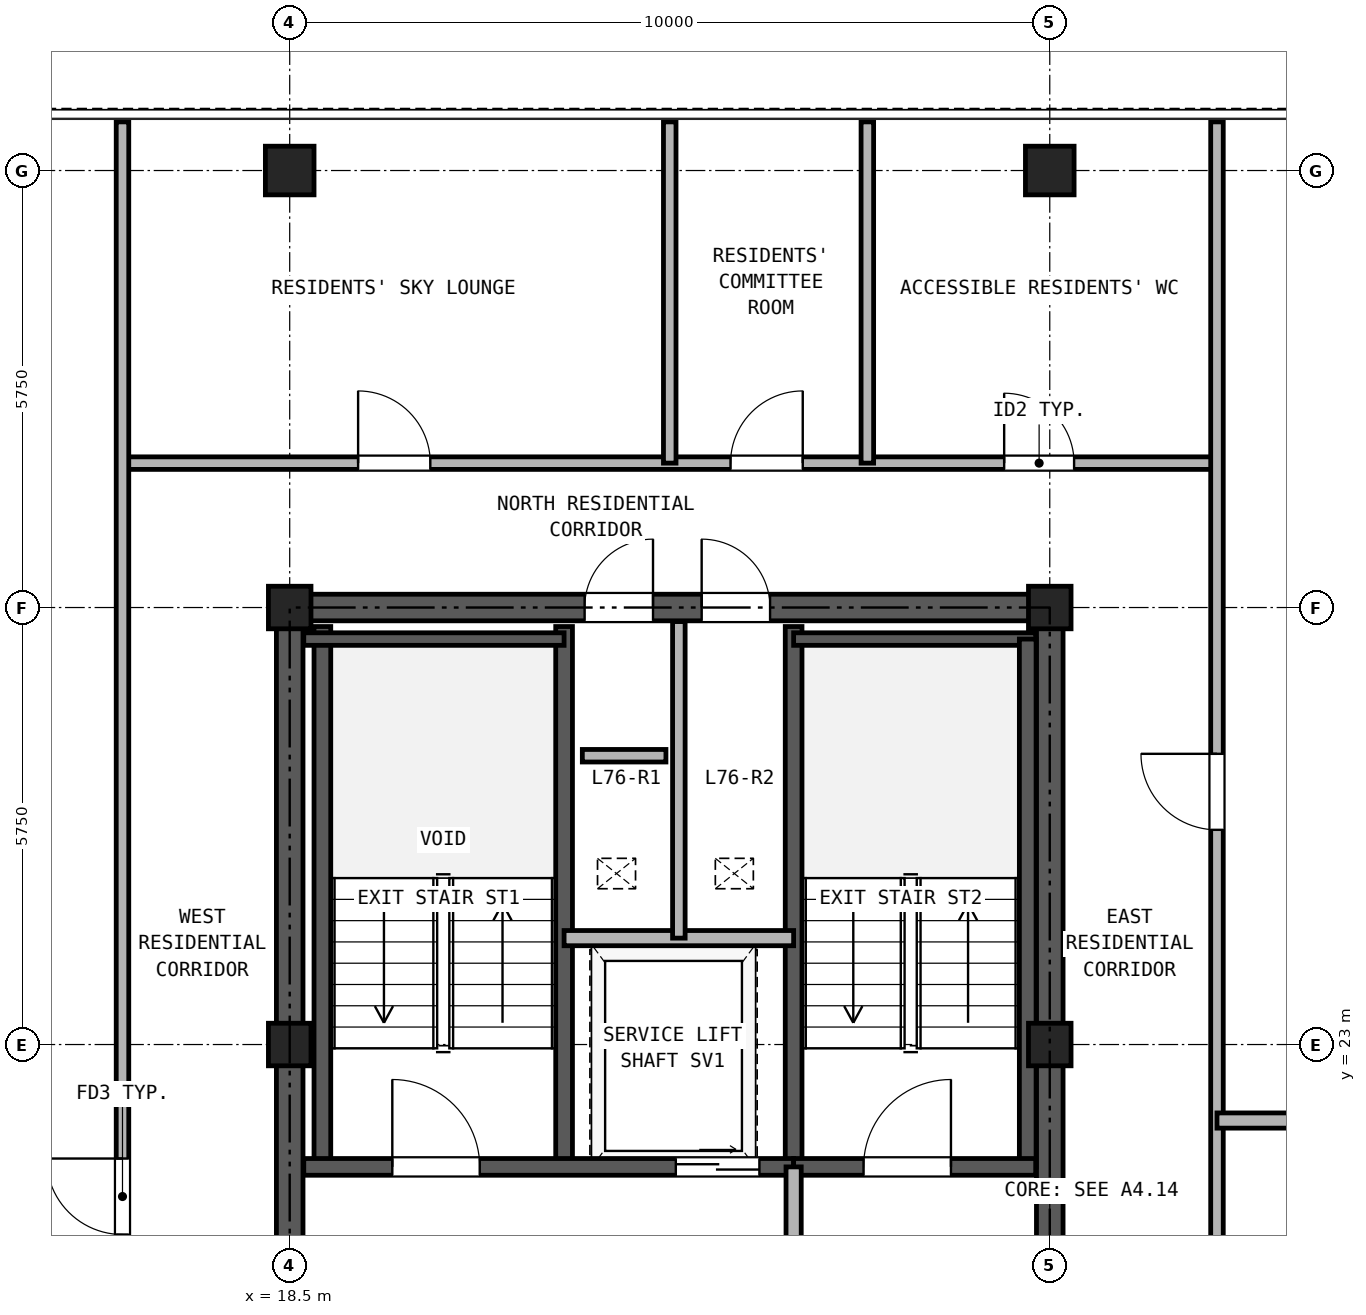
"""IFC4 building model, lengths in metres.
Left out: names, types, materials, properties, quantities, classifications, styles, units other than length and angle.
Written with IfcOpenShell. Run it as: python <this file> out.ifc"""

import sys

from ifc_helpers import new_model, si_unit, direction, frame, frame_2d, origin, origin_2d, place, context, subcontext, project, spatial, rectangle, hollow_rectangle, extrude, source, transform, mapped, element, fill, save


model = new_model("IFC4")
c1 = context("Model", 3, precision=1e-05, world=origin(), true_north=direction((0.0, 1.0)))
c2 = subcontext(c1, "Body", "Model", "MODEL_VIEW")
j1 = project(units=[si_unit("LENGTHUNIT", "METRE"), si_unit("PLANEANGLEUNIT", "RADIAN")], contexts=[c1])
p1 = place(None, origin())
s1 = spatial("IfcSite", under=j1, at=p1, CompositionType="ELEMENT")
p2 = place(p1, origin())
s2 = spatial("IfcBuilding", under=s1, at=p2, CompositionType="ELEMENT")
p3 = place(p2, frame((0.0, 0.0, 264.9)))
s3 = spatial("IfcBuildingStorey", under=s2, at=p3, CompositionType="ELEMENT", Elevation=264.9)
m1 = source(origin(), c2, "Body", "SweptSolid", [
    extrude(hollow_rectangle(XDim=0.64, YDim=0.64, WallThickness=0.035, at=origin_2d()), origin(), (0.0, 0.0, 1.0), 2.98),
])
for number, where, z_axis, x_axis in (
    (1, (18.5, 34.5, 0.0), (0.0, 0.0, 1.0), (1.0, 0.0, 0.0)),
    (2, (28.5, 34.5, 0.0), (0.0, 0.0, 1.0), (1.0, 0.0, 0.0)),
):
    element("IfcColumn", number, at=place(p3, frame(where, z_axis=z_axis, x_axis=x_axis)), inside=s3, PredefinedType="COLUMN", context=c2, shape_type="MappedRepresentation", body=[
        mapped(m1, transform((0.0, 0.0, 0.0), x_axis=(1.0, 0.0, 0.0), y_axis=(0.0, 1.0, 0.0), z_axis=(0.0, 0.0, 1.0), scale=1.0)),
    ])
m2 = source(origin(), c2, "Body", "SweptSolid", [
    extrude(hollow_rectangle(XDim=0.56, YDim=0.56, WallThickness=0.03, at=origin_2d()), origin(), (0.0, 0.0, 1.0), 2.98),
])
for number, where, z_axis, x_axis in (
    (3, (18.5, 23.0, 0.0), (0.0, 0.0, 1.0), (1.0, 0.0, 0.0)),
    (4, (18.5, 28.75, 0.0), (0.0, 0.0, 1.0), (1.0, 0.0, 0.0)),
    (5, (28.5, 23.0, 0.0), (0.0, 0.0, 1.0), (1.0, 0.0, 0.0)),
    (6, (28.5, 28.75, 0.0), (0.0, 0.0, 1.0), (1.0, 0.0, 0.0)),
):
    element("IfcColumn", number, at=place(p3, frame(where, z_axis=z_axis, x_axis=x_axis)), inside=s3, PredefinedType="COLUMN", context=c2, shape_type="MappedRepresentation", body=[
        mapped(m2, transform((0.0, 0.0, 0.0), x_axis=(1.0, 0.0, 0.0), y_axis=(0.0, 1.0, 0.0), z_axis=(0.0, 0.0, 1.0), scale=1.0)),
    ])
p4 = place(p3, frame((18.325, 28.75, 0.0), z_axis=(0.0, 0.0, 1.0), x_axis=(1.0, 0.0, 0.0)))
e7 = element("IfcWall", 7, at=p4, inside=s3, PredefinedType="SHEAR", context=c2, shape_type="SweptSolid", body=[
    extrude(rectangle(XDim=10.35, YDim=0.35, at=frame_2d((5.175, 0.0))), origin(), (0.0, 0.0, 1.0), 2.98),
])
p5 = place(p4, frame((4.055, 0.0, 0.0)))
e8 = element("IfcOpeningElement", 8, at=p5, cuts=e7, PredefinedType="OPENING", context=c2, shape_type="SweptSolid", body=[
    extrude(rectangle(XDim=0.9, YDim=2.05, at=frame_2d((0.45, 1.025))), frame((0.0, 0.185, 0.0), z_axis=(0.0, -1.0, 0.0), x_axis=(1.0, 0.0, 0.0)), (0.0, 0.0, 1.0), 0.37),
])
p6 = place(p4, frame((5.595, 0.0, 0.0)))
e9 = element("IfcOpeningElement", 9, at=p6, cuts=e7, PredefinedType="OPENING", context=c2, shape_type="SweptSolid", body=[
    extrude(rectangle(XDim=0.9, YDim=2.05, at=frame_2d((0.45, 1.025))), frame((0.0, 0.185, 0.0), z_axis=(0.0, -1.0, 0.0), x_axis=(1.0, 0.0, 0.0)), (0.0, 0.0, 1.0), 0.37),
])
p7 = place(p3, frame((18.5, 11.675, 0.0), z_axis=(0.0, 0.0, 1.0), x_axis=(0.0, 1.0, 0.0)))
e10 = element("IfcWall", 10, at=p7, inside=s3, PredefinedType="SHEAR", context=c2, shape_type="SweptSolid", body=[
    extrude(rectangle(XDim=16.9, YDim=0.35, at=frame_2d((8.45, 0.0))), origin(), (0.0, 0.0, 1.0), 2.98),
])
p8 = place(p7, frame((7.475, 0.0, 0.0)))
e11 = element("IfcOpeningElement", 11, at=p8, cuts=e10, PredefinedType="OPENING", context=c2, shape_type="SweptSolid", body=[
    extrude(rectangle(XDim=1.15, YDim=2.2, at=frame_2d((0.575, 1.1))), frame((0.0, 0.185, 0.0), z_axis=(0.0, -1.0, 0.0), x_axis=(1.0, 0.0, 0.0)), (0.0, 0.0, 1.0), 0.37),
])
p9 = place(p3, frame((28.5, 11.675, 0.0), z_axis=(0.0, 0.0, 1.0), x_axis=(0.0, 1.0, 0.0)))
e12 = element("IfcWall", 12, at=p9, inside=s3, PredefinedType="SHEAR", context=c2, shape_type="SweptSolid", body=[
    extrude(rectangle(XDim=16.9, YDim=0.35, at=frame_2d((8.45, 0.0))), origin(), (0.0, 0.0, 1.0), 2.98),
])
p10 = place(p9, frame((7.475, 0.0, 0.0)))
e13 = element("IfcOpeningElement", 13, at=p10, cuts=e12, PredefinedType="OPENING", context=c2, shape_type="SweptSolid", body=[
    extrude(rectangle(XDim=1.15, YDim=2.2, at=frame_2d((0.575, 1.1))), frame((0.0, 0.185, 0.0), z_axis=(0.0, -1.0, 0.0), x_axis=(1.0, 0.0, 0.0)), (0.0, 0.0, 1.0), 0.37),
])
for number, where, z_axis, x_axis in (
    (14, (18.93, 21.39, 0.0), (0.0, 0.0, 1.0), (0.0, 1.0, 0.0)),
    (15, (22.11, 21.39, 0.0), (0.0, 0.0, 1.0), (0.0, 1.0, 0.0)),
    (16, (25.13, 21.39, 0.0), (0.0, 0.0, 1.0), (0.0, 1.0, 0.0)),
):
    element("IfcWall", number, at=place(p3, frame(where, z_axis=z_axis, x_axis=x_axis)), inside=s3, PredefinedType="SOLIDWALL", context=c2, shape_type="SweptSolid", body=[
        extrude(rectangle(XDim=7.11, YDim=0.22, at=frame_2d((3.555, 0.0))), origin(), (0.0, 0.0, 1.0), 2.98),
    ])
p11 = place(p3, frame((18.685, 28.335, 0.0), z_axis=(0.0, 0.0, 1.0), x_axis=(1.0, 0.0, 0.0)))
e17 = element("IfcWall", 17, at=p11, inside=s3, PredefinedType="PARTITIONING", context=c2, shape_type="SweptSolid", body=[
    extrude(rectangle(XDim=3.425, YDim=0.165, at=frame_2d((1.712, 0.0))), origin(), (0.0, 0.0, 1.0), 2.98),
])
p12 = place(p3, frame((25.13, 28.335, 0.0), z_axis=(0.0, 0.0, 1.0), x_axis=(1.0, 0.0, 0.0)))
e18 = element("IfcWall", 18, at=p12, inside=s3, PredefinedType="PARTITIONING", context=c2, shape_type="SweptSolid", body=[
    extrude(rectangle(XDim=3.185, YDim=0.165, at=frame_2d((1.593, 0.0))), origin(), (0.0, 0.0, 1.0), 2.98),
])
p13 = place(p3, frame((28.21, 21.39, 0.0), z_axis=(0.0, 0.0, 1.0), x_axis=(0.0, 1.0, 0.0)))
e19 = element("IfcWall", 19, at=p13, inside=s3, PredefinedType="SOLIDWALL", context=c2, shape_type="SweptSolid", body=[
    extrude(rectangle(XDim=6.945, YDim=0.22, at=frame_2d((3.473, 0.0))), origin(), (0.0, 0.0, 1.0), 2.98),
])
p14 = place(p3, frame((18.685, 21.39, 0.0), z_axis=(0.0, 0.0, 1.0), x_axis=(1.0, 0.0, 0.0)))
e20 = element("IfcWall", 20, at=p14, inside=s3, PredefinedType="SOLIDWALL", context=c2, shape_type="SweptSolid", body=[
    extrude(rectangle(XDim=6.445, YDim=0.22, at=frame_2d((3.222, 0.0))), origin(), (0.0, 0.0, 1.0), 2.98),
])
p15 = place(p14, frame((1.165, 0.0, 0.0)))
e21 = element("IfcOpeningElement", 21, at=p15, cuts=e20, PredefinedType="OPENING", context=c2, shape_type="SweptSolid", body=[
    extrude(rectangle(XDim=1.15, YDim=2.2, at=frame_2d((0.575, 1.1))), frame((0.0, 0.12, 0.0), z_axis=(0.0, -1.0, 0.0), x_axis=(1.0, 0.0, 0.0)), (0.0, 0.0, 1.0), 0.24),
])
p16 = place(p14, frame((4.895, 0.0, 0.0)))
e22 = element("IfcOpeningElement", 22, at=p16, cuts=e20, PredefinedType="OPENING", context=c2, shape_type="SweptSolid", body=[
    extrude(rectangle(XDim=1.1, YDim=2.25, at=frame_2d((0.55, 1.125))), frame((0.0, 0.12, 0.0), z_axis=(0.0, -1.0, 0.0), x_axis=(1.0, 0.0, 0.0)), (0.0, 0.0, 1.0), 0.24),
])
p17 = place(p3, frame((25.13, 21.39, 0.0), z_axis=(0.0, 0.0, 1.0), x_axis=(1.0, 0.0, 0.0)))
e23 = element("IfcWall", 23, at=p17, inside=s3, PredefinedType="SOLIDWALL", context=c2, shape_type="SweptSolid", body=[
    extrude(rectangle(XDim=3.185, YDim=0.22, at=frame_2d((1.593, 0.0))), origin(), (0.0, 0.0, 1.0), 2.98),
])
p18 = place(p17, frame((0.92, 0.0, 0.0)))
e24 = element("IfcOpeningElement", 24, at=p18, cuts=e23, PredefinedType="OPENING", context=c2, shape_type="SweptSolid", body=[
    extrude(rectangle(XDim=1.15, YDim=2.2, at=frame_2d((0.575, 1.1))), frame((0.0, 0.12, 0.0), z_axis=(0.0, -1.0, 0.0), x_axis=(1.0, 0.0, 0.0)), (0.0, 0.0, 1.0), 0.24),
])
p19 = place(p3, frame((22.11, 24.4, 0.0), z_axis=(0.0, 0.0, 1.0), x_axis=(1.0, 0.0, 0.0)))
e25 = element("IfcWall", 25, at=p19, inside=s3, PredefinedType="PARTITIONING", context=c2, shape_type="SweptSolid", body=[
    extrude(rectangle(XDim=3.02, YDim=0.2, at=frame_2d((1.51, 0.0))), origin(), (0.0, 0.0, 1.0), 2.98),
])
p20 = place(p3, frame((23.62, 24.4, 0.0), z_axis=(0.0, 0.0, 1.0), x_axis=(0.0, 1.0, 0.0)))
e26 = element("IfcWall", 26, at=p20, inside=s3, PredefinedType="PARTITIONING", context=c2, shape_type="SweptSolid", body=[
    extrude(rectangle(XDim=4.165, YDim=0.165, at=frame_2d((2.083, 0.0))), origin(), (0.0, 0.0, 1.0), 2.98),
])
p21 = place(p3, frame((25.13, 18.0, 0.0), z_axis=(0.0, 0.0, 1.0), x_axis=(0.0, 1.0, 0.0)))
e27 = element("IfcWall", 27, at=p21, inside=s3, PredefinedType="PARTITIONING", context=c2, shape_type="SweptSolid", body=[
    extrude(rectangle(XDim=3.39, YDim=0.2, at=frame_2d((1.695, 0.0))), origin(), (0.0, 0.0, 1.0), 2.98),
])
p22 = place(p21, frame((1.1, 0.0, 0.0)))
e28 = element("IfcOpeningElement", 28, at=p22, cuts=e27, PredefinedType="OPENING", context=c2, shape_type="SweptSolid", body=[
    extrude(rectangle(XDim=1.15, YDim=2.2, at=frame_2d((0.575, 1.1))), frame((0.0, 0.11, 0.0), z_axis=(0.0, -1.0, 0.0), x_axis=(1.0, 0.0, 0.0)), (0.0, 0.0, 1.0), 0.22),
])
p23 = place(p3, frame((16.3, 30.65, 0.0), z_axis=(0.0, 0.0, 1.0), x_axis=(1.0, 0.0, 0.0)))
e29 = element("IfcWall", 29, at=p23, inside=s3, PredefinedType="PARTITIONING", context=c2, shape_type="SweptSolid", body=[
    extrude(rectangle(XDim=14.4, YDim=0.165, at=frame_2d((7.2, 0.0))), origin(), (0.0, 0.0, 1.0), 2.98),
])
p24 = place(p23, frame((3.1, 0.0, 0.0)))
e30 = element("IfcOpeningElement", 30, at=p24, cuts=e29, PredefinedType="OPENING", context=c2, shape_type="SweptSolid", body=[
    extrude(rectangle(XDim=0.95, YDim=2.15, at=frame_2d((0.475, 1.075))), frame((0.0, 0.093, 0.0), z_axis=(0.0, -1.0, 0.0), x_axis=(1.0, 0.0, 0.0)), (0.0, 0.0, 1.0), 0.185),
])
p25 = place(p23, frame((8.0, 0.0, 0.0)))
e31 = element("IfcOpeningElement", 31, at=p25, cuts=e29, PredefinedType="OPENING", context=c2, shape_type="SweptSolid", body=[
    extrude(rectangle(XDim=0.95, YDim=2.15, at=frame_2d((0.475, 1.075))), frame((0.0, 0.093, 0.0), z_axis=(0.0, -1.0, 0.0), x_axis=(1.0, 0.0, 0.0)), (0.0, 0.0, 1.0), 0.185),
])
p26 = place(p23, frame((11.6, 0.0, 0.0)))
e32 = element("IfcOpeningElement", 32, at=p26, cuts=e29, PredefinedType="OPENING", context=c2, shape_type="SweptSolid", body=[
    extrude(rectangle(XDim=0.92, YDim=2.1, at=frame_2d((0.46, 1.05))), frame((0.0, 0.093, 0.0), z_axis=(0.0, -1.0, 0.0), x_axis=(1.0, 0.0, 0.0)), (0.0, 0.0, 1.0), 0.185),
])
p27 = place(p3, frame((16.3, 11.35, 0.0), z_axis=(0.0, 0.0, 1.0), x_axis=(0.0, 1.0, 0.0)))
e33 = element("IfcWall", 33, at=p27, inside=s3, PredefinedType="PARTITIONING", context=c2, shape_type="SweptSolid", body=[
    extrude(rectangle(XDim=23.79, YDim=0.165, at=frame_2d((11.895, 0.0))), origin(), (0.0, 0.0, 1.0), 2.98),
])
p28 = place(p27, frame((9.15, 0.0, 0.0)))
e34 = element("IfcOpeningElement", 34, at=p28, cuts=e33, PredefinedType="OPENING", context=c2, shape_type="SweptSolid", body=[
    extrude(rectangle(XDim=1.0, YDim=2.15, at=frame_2d((0.5, 1.075))), frame((0.0, 0.093, 0.0), z_axis=(0.0, -1.0, 0.0), x_axis=(1.0, 0.0, 0.0)), (0.0, 0.0, 1.0), 0.185),
])
p29 = place(p3, frame((30.7, 11.35, 0.0), z_axis=(0.0, 0.0, 1.0), x_axis=(0.0, 1.0, 0.0)))
e35 = element("IfcWall", 35, at=p29, inside=s3, PredefinedType="PARTITIONING", context=c2, shape_type="SweptSolid", body=[
    extrude(rectangle(XDim=23.79, YDim=0.165, at=frame_2d((11.895, 0.0))), origin(), (0.0, 0.0, 1.0), 2.98),
])
p30 = place(p29, frame((4.825, 0.0, 0.0)))
e36 = element("IfcOpeningElement", 36, at=p30, cuts=e35, PredefinedType="OPENING", context=c2, shape_type="SweptSolid", body=[
    extrude(rectangle(XDim=1.0, YDim=2.15, at=frame_2d((0.5, 1.075))), frame((0.0, 0.093, 0.0), z_axis=(0.0, -1.0, 0.0), x_axis=(1.0, 0.0, 0.0)), (0.0, 0.0, 1.0), 0.185),
])
p31 = place(p29, frame((14.475, 0.0, 0.0)))
e37 = element("IfcOpeningElement", 37, at=p31, cuts=e35, PredefinedType="OPENING", context=c2, shape_type="SweptSolid", body=[
    extrude(rectangle(XDim=1.0, YDim=2.15, at=frame_2d((0.5, 1.075))), frame((0.0, 0.093, 0.0), z_axis=(0.0, -1.0, 0.0), x_axis=(1.0, 0.0, 0.0)), (0.0, 0.0, 1.0), 0.185),
])
p32 = place(p3, frame((30.7, 22.0, 0.0), z_axis=(0.0, 0.0, 1.0), x_axis=(1.0, 0.0, 0.0)))
e38 = element("IfcWall", 38, at=p32, inside=s3, PredefinedType="PARTITIONING", context=c2, shape_type="SweptSolid", body=[
    extrude(rectangle(XDim=10.94, YDim=0.2, at=frame_2d((5.47, 0.0))), origin(), (0.0, 0.0, 1.0), 2.98),
])
for number, where, z_axis, x_axis in (
    (39, (23.5, 30.65, 0.0), (0.0, 0.0, 1.0), (0.0, 1.0, 0.0)),
    (40, (26.1, 30.65, 0.0), (0.0, 0.0, 1.0), (0.0, 1.0, 0.0)),
):
    element("IfcWall", number, at=place(p3, frame(where, z_axis=z_axis, x_axis=x_axis)), inside=s3, PredefinedType="PARTITIONING", context=c2, shape_type="SweptSolid", body=[
        extrude(rectangle(XDim=4.49, YDim=0.165, at=frame_2d((2.245, 0.0))), origin(), (0.0, 0.0, 1.0), 2.98),
    ])
p33 = place(p3, frame((22.35, 26.8, 0.0), z_axis=(0.0, 0.0, 1.0), x_axis=(1.0, 0.0, 0.0)))
e41 = element("IfcWall", 41, at=p33, inside=s3, PredefinedType="PARTITIONING", context=c2, shape_type="SweptSolid", body=[
    extrude(rectangle(XDim=1.1, YDim=0.165, at=frame_2d((0.55, 0.0))), origin(), (0.0, 0.0, 1.0), 2.98),
])
p34 = place(p15, frame((1.15, 0.0, 0.0), z_axis=(0.0, 0.0, 1.0), x_axis=(-1.0, 0.0, 0.0)))
e42 = element("IfcDoor", 42, at=p34, inside=s3, OperationType="SINGLE_SWING_LEFT", PredefinedType="DOOR", context=c2, shape_type="SweptSolid", body=[
    extrude(rectangle(XDim=1.15, YDim=2.2, at=frame_2d((0.575, 1.1))), frame((0.0, 0.025, 0.0), z_axis=(0.0, -1.0, 0.0), x_axis=(1.0, 0.0, 0.0)), (0.0, 0.0, 1.0), 0.05),
])
fill(e21, e42)
p35 = place(p18, frame((1.15, 0.0, 0.0), z_axis=(0.0, 0.0, 1.0), x_axis=(-1.0, 0.0, 0.0)))
e43 = element("IfcDoor", 43, at=p35, inside=s3, OperationType="SINGLE_SWING_RIGHT", PredefinedType="DOOR", context=c2, shape_type="SweptSolid", body=[
    extrude(rectangle(XDim=1.15, YDim=2.2, at=frame_2d((0.575, 1.1))), frame((0.0, 0.025, 0.0), z_axis=(0.0, -1.0, 0.0), x_axis=(1.0, 0.0, 0.0)), (0.0, 0.0, 1.0), 0.05),
])
fill(e24, e43)
p36 = place(p16, frame((1.1, 0.0, 0.0), z_axis=(0.0, 0.0, 1.0), x_axis=(-1.0, 0.0, 0.0)))
e44 = element("IfcDoor", 44, at=p36, inside=s3, OperationType="DOUBLE_DOOR_SLIDING", PredefinedType="DOOR", context=c2, shape_type="SweptSolid", body=[
    extrude(rectangle(XDim=1.1, YDim=2.25, at=frame_2d((0.55, 1.125))), frame((0.0, 0.025, 0.0), z_axis=(0.0, -1.0, 0.0), x_axis=(1.0, 0.0, 0.0)), (0.0, 0.0, 1.0), 0.05),
])
fill(e22, e44)
p37 = place(p5, origin())
e45 = element("IfcDoor", 45, at=p37, inside=s3, OperationType="SINGLE_SWING_RIGHT", PredefinedType="DOOR", context=c2, shape_type="SweptSolid", body=[
    extrude(rectangle(XDim=0.9, YDim=2.05, at=frame_2d((0.45, 1.025))), frame((0.0, 0.025, 0.0), z_axis=(0.0, -1.0, 0.0), x_axis=(1.0, 0.0, 0.0)), (0.0, 0.0, 1.0), 0.05),
])
fill(e8, e45)
p38 = place(p6, origin())
e46 = element("IfcDoor", 46, at=p38, inside=s3, OperationType="SINGLE_SWING_LEFT", PredefinedType="DOOR", context=c2, shape_type="SweptSolid", body=[
    extrude(rectangle(XDim=0.9, YDim=2.05, at=frame_2d((0.45, 1.025))), frame((0.0, 0.025, 0.0), z_axis=(0.0, -1.0, 0.0), x_axis=(1.0, 0.0, 0.0)), (0.0, 0.0, 1.0), 0.05),
])
fill(e9, e46)
p39 = place(p28, origin())
e47 = element("IfcDoor", 47, at=p39, inside=s3, OperationType="SINGLE_SWING_RIGHT", PredefinedType="DOOR", context=c2, shape_type="SweptSolid", body=[
    extrude(rectangle(XDim=1.0, YDim=2.15, at=frame_2d((0.5, 1.075))), frame((0.0, 0.025, 0.0), z_axis=(0.0, -1.0, 0.0), x_axis=(1.0, 0.0, 0.0)), (0.0, 0.0, 1.0), 0.05),
])
fill(e34, e47)
p40 = place(p31, frame((1.0, 0.0, 0.0), z_axis=(0.0, 0.0, 1.0), x_axis=(-1.0, 0.0, 0.0)))
e48 = element("IfcDoor", 48, at=p40, inside=s3, OperationType="SINGLE_SWING_RIGHT", PredefinedType="DOOR", context=c2, shape_type="SweptSolid", body=[
    extrude(rectangle(XDim=1.0, YDim=2.15, at=frame_2d((0.5, 1.075))), frame((0.0, 0.025, 0.0), z_axis=(0.0, -1.0, 0.0), x_axis=(1.0, 0.0, 0.0)), (0.0, 0.0, 1.0), 0.05),
])
fill(e37, e48)
p41 = place(p24, origin())
e49 = element("IfcDoor", 49, at=p41, inside=s3, OperationType="SINGLE_SWING_LEFT", PredefinedType="DOOR", context=c2, shape_type="SweptSolid", body=[
    extrude(rectangle(XDim=0.95, YDim=2.15, at=frame_2d((0.475, 1.075))), frame((0.0, 0.025, 0.0), z_axis=(0.0, -1.0, 0.0), x_axis=(1.0, 0.0, 0.0)), (0.0, 0.0, 1.0), 0.05),
])
fill(e30, e49)
p42 = place(p25, origin())
e50 = element("IfcDoor", 50, at=p42, inside=s3, OperationType="SINGLE_SWING_RIGHT", PredefinedType="DOOR", context=c2, shape_type="SweptSolid", body=[
    extrude(rectangle(XDim=0.95, YDim=2.15, at=frame_2d((0.475, 1.075))), frame((0.0, 0.025, 0.0), z_axis=(0.0, -1.0, 0.0), x_axis=(1.0, 0.0, 0.0)), (0.0, 0.0, 1.0), 0.05),
])
fill(e31, e50)
p43 = place(p26, origin())
e51 = element("IfcDoor", 51, at=p43, inside=s3, OperationType="SINGLE_SWING_LEFT", PredefinedType="DOOR", context=c2, shape_type="SweptSolid", body=[
    extrude(rectangle(XDim=0.92, YDim=2.1, at=frame_2d((0.46, 1.05))), frame((0.0, 0.025, 0.0), z_axis=(0.0, -1.0, 0.0), x_axis=(1.0, 0.0, 0.0)), (0.0, 0.0, 1.0), 0.05),
])
fill(e32, e51)
save(model, sys.argv[1])
